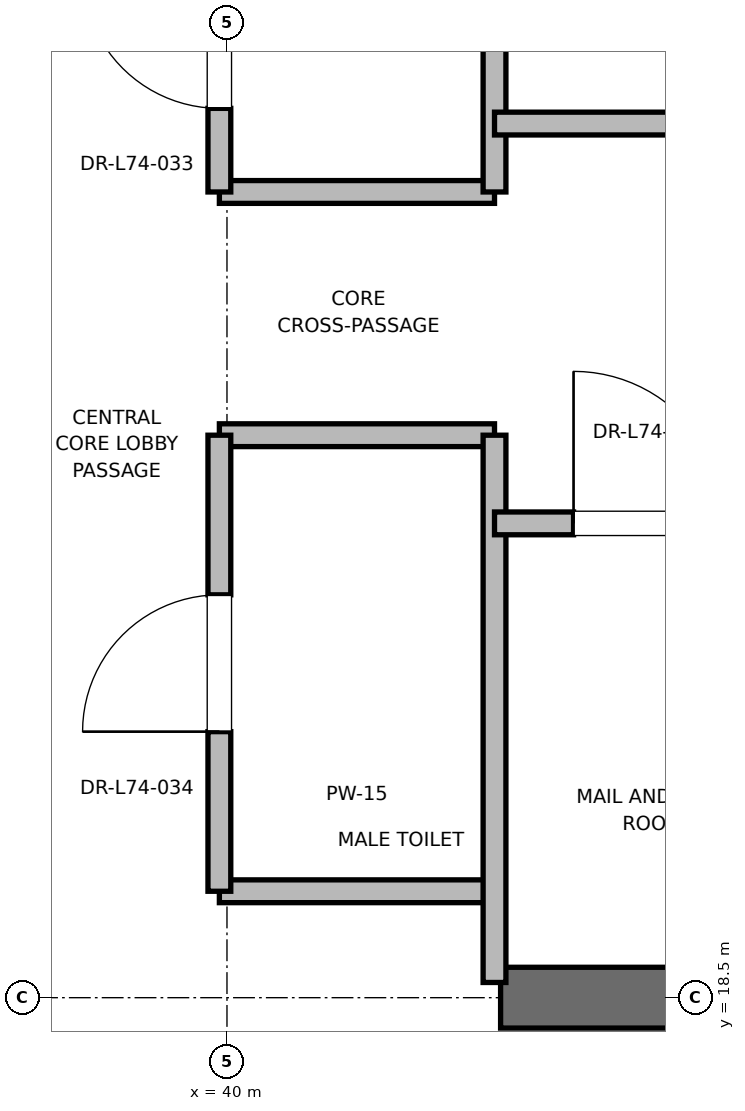
"""IFC4 building model, lengths in metres.
Left out: names, types, materials, properties, quantities, classifications, styles, units other than length and angle.
Written with IfcOpenShell. Run it as: python <this file> out.ifc"""

import sys

from ifc_helpers import new_model, si_unit, direction, frame, frame_2d, origin, place, context, subcontext, project, spatial, rectangle, extrude, element, fill, save


model = new_model("IFC4")
c1 = context("Model", 3, precision=1e-05, world=origin(), true_north=direction((0.0, 1.0)))
c2 = subcontext(c1, "Body", "Model", "MODEL_VIEW")
j1 = project(units=[si_unit("LENGTHUNIT", "METRE"), si_unit("PLANEANGLEUNIT", "RADIAN")], contexts=[c1])
p1 = place(None, origin())
s1 = spatial("IfcSite", under=j1, at=p1, CompositionType="ELEMENT")
p2 = place(p1, origin())
s2 = spatial("IfcBuilding", under=s1, at=p2, CompositionType="ELEMENT")
p3 = place(p2, frame((0.0, 0.0, 318.8)))
s3 = spatial("IfcBuildingStorey", under=s2, at=p3, CompositionType="ELEMENT", Elevation=318.8)
p4 = place(p3, frame((41.8, 18.5, 0.0), z_axis=(0.0, 0.0, 1.0), x_axis=(1.0, 0.0, 0.0)))
e1 = element("IfcWall", 1, at=p4, inside=s3, PredefinedType="SHEAR", context=c2, shape_type="SweptSolid", body=[
    extrude(rectangle(XDim=9.2, YDim=0.4, at=frame_2d((4.6, 0.0))), origin(), (0.0, 0.0, 1.0), 3.785),
])
for number, where, z_axis, x_axis in (
    (2, (39.95, 19.2, 0.0), (0.0, 0.0, 1.0), (1.0, 0.0, 0.0)),
    (3, (39.95, 22.2, 0.0), (0.0, 0.0, 1.0), (1.0, 0.0, 0.0)),
    (4, (39.95, 23.8, 0.0), (0.0, 0.0, 1.0), (1.0, 0.0, 0.0)),
):
    element("IfcWall", number, at=place(p3, frame(where, z_axis=z_axis, x_axis=x_axis)), inside=s3, PredefinedType="PARTITIONING", context=c2, shape_type="SweptSolid", body=[
        extrude(rectangle(XDim=1.81, YDim=0.15, at=frame_2d((0.905, 0.0))), origin(), (0.0, 0.0, 1.0), 2.85),
    ])
p5 = place(p3, frame((41.76, 18.6, 0.0), z_axis=(0.0, 0.0, 1.0), x_axis=(0.0, 1.0, 0.0)))
e5 = element("IfcWall", 5, at=p5, inside=s3, PredefinedType="PARTITIONING", context=c2, shape_type="SweptSolid", body=[
    extrude(rectangle(XDim=3.6, YDim=0.15, at=frame_2d((1.8, 0.0))), origin(), (0.0, 0.0, 1.0), 2.85),
])
p6 = place(p3, frame((41.76, 23.8, 0.0), z_axis=(0.0, 0.0, 1.0), x_axis=(0.0, 1.0, 0.0)))
e6 = element("IfcWall", 6, at=p6, inside=s3, PredefinedType="PARTITIONING", context=c2, shape_type="SweptSolid", body=[
    extrude(rectangle(XDim=4.0, YDim=0.15, at=frame_2d((2.0, 0.0))), origin(), (0.0, 0.0, 1.0), 2.85),
])
p7 = place(p3, frame((39.95, 19.2, 0.0), z_axis=(0.0, 0.0, 1.0), x_axis=(0.0, 1.0, 0.0)))
e7 = element("IfcWall", 7, at=p7, inside=s3, PredefinedType="PARTITIONING", context=c2, shape_type="SweptSolid", body=[
    extrude(rectangle(XDim=3.0, YDim=0.15, at=frame_2d((1.5, 0.0))), origin(), (0.0, 0.0, 1.0), 2.85),
])
p8 = place(p7, frame((1.05, 0.0, 0.0)))
e8 = element("IfcOpeningElement", 8, at=p8, cuts=e7, PredefinedType="OPENING", context=c2, shape_type="SweptSolid", body=[
    extrude(rectangle(XDim=0.9, YDim=2.1, at=frame_2d((0.45, 1.05))), frame((0.0, 0.075, 0.0), z_axis=(0.0, -1.0, 0.0), x_axis=(1.0, 0.0, 0.0)), (0.0, 0.0, 1.0), 0.15),
])
p9 = place(p3, frame((39.95, 23.8, 0.0), z_axis=(0.0, 0.0, 1.0), x_axis=(0.0, 1.0, 0.0)))
e9 = element("IfcWall", 9, at=p9, inside=s3, PredefinedType="PARTITIONING", context=c2, shape_type="SweptSolid", body=[
    extrude(rectangle(XDim=2.0, YDim=0.15, at=frame_2d((1.0, 0.0))), origin(), (0.0, 0.0, 1.0), 2.85),
])
p10 = place(p9, frame((0.55, 0.0, 0.0)))
e10 = element("IfcOpeningElement", 10, at=p10, cuts=e9, PredefinedType="OPENING", context=c2, shape_type="SweptSolid", body=[
    extrude(rectangle(XDim=0.9, YDim=2.1, at=frame_2d((0.45, 1.05))), frame((0.0, 0.075, 0.0), z_axis=(0.0, -1.0, 0.0), x_axis=(1.0, 0.0, 0.0)), (0.0, 0.0, 1.0), 0.15),
])
p11 = place(p3, frame((41.76, 21.62, 0.0), z_axis=(0.0, 0.0, 1.0), x_axis=(1.0, 0.0, 0.0)))
e11 = element("IfcWall", 11, at=p11, inside=s3, PredefinedType="PARTITIONING", context=c2, shape_type="SweptSolid", body=[
    extrude(rectangle(XDim=2.04, YDim=0.15, at=frame_2d((1.02, 0.0))), origin(), (0.0, 0.0, 1.0), 2.85),
])
p12 = place(p11, frame((0.52, 0.0, 0.0)))
e12 = element("IfcOpeningElement", 12, at=p12, cuts=e11, PredefinedType="OPENING", context=c2, shape_type="SweptSolid", body=[
    extrude(rectangle(XDim=1.0, YDim=2.15, at=frame_2d((0.5, 1.075))), frame((0.0, 0.075, 0.0), z_axis=(0.0, -1.0, 0.0), x_axis=(1.0, 0.0, 0.0)), (0.0, 0.0, 1.0), 0.15),
])
p13 = place(p3, frame((41.76, 24.25, 0.0), z_axis=(0.0, 0.0, 1.0), x_axis=(1.0, 0.0, 0.0)))
e13 = element("IfcWall", 13, at=p13, inside=s3, PredefinedType="PARTITIONING", context=c2, shape_type="SweptSolid", body=[
    extrude(rectangle(XDim=3.39, YDim=0.15, at=frame_2d((1.695, 0.0))), origin(), (0.0, 0.0, 1.0), 2.85),
])
p14 = place(p13, frame((1.255, 0.0, 0.0)))
e14 = element("IfcOpeningElement", 14, at=p14, cuts=e13, PredefinedType="OPENING", context=c2, shape_type="SweptSolid", body=[
    extrude(rectangle(XDim=0.88, YDim=2.1, at=frame_2d((0.44, 1.05))), frame((0.0, 0.075, 0.0), z_axis=(0.0, -1.0, 0.0), x_axis=(1.0, 0.0, 0.0)), (0.0, 0.0, 1.0), 0.15),
])
p15 = place(p8, origin())
e15 = element("IfcDoor", 15, at=p15, inside=s3, OperationType="SINGLE_SWING_LEFT", PredefinedType="DOOR", context=c2, shape_type="SweptSolid", body=[
    extrude(rectangle(XDim=0.9, YDim=2.1, at=frame_2d((0.45, 1.05))), frame((0.0, 0.025, 0.0), z_axis=(0.0, -1.0, 0.0), x_axis=(1.0, 0.0, 0.0)), (0.0, 0.0, 1.0), 0.05),
])
fill(e8, e15)
p16 = place(p10, origin())
e16 = element("IfcDoor", 16, at=p16, inside=s3, OperationType="SINGLE_SWING_RIGHT", PredefinedType="DOOR", context=c2, shape_type="SweptSolid", body=[
    extrude(rectangle(XDim=0.9, YDim=2.1, at=frame_2d((0.45, 1.05))), frame((0.0, 0.025, 0.0), z_axis=(0.0, -1.0, 0.0), x_axis=(1.0, 0.0, 0.0)), (0.0, 0.0, 1.0), 0.05),
])
fill(e10, e16)
p17 = place(p12, origin())
e17 = element("IfcDoor", 17, at=p17, inside=s3, OperationType="SINGLE_SWING_LEFT", PredefinedType="DOOR", context=c2, shape_type="SweptSolid", body=[
    extrude(rectangle(XDim=1.0, YDim=2.15, at=frame_2d((0.5, 1.075))), frame((0.0, 0.025, 0.0), z_axis=(0.0, -1.0, 0.0), x_axis=(1.0, 0.0, 0.0)), (0.0, 0.0, 1.0), 0.05),
])
fill(e12, e17)
save(model, sys.argv[1])
